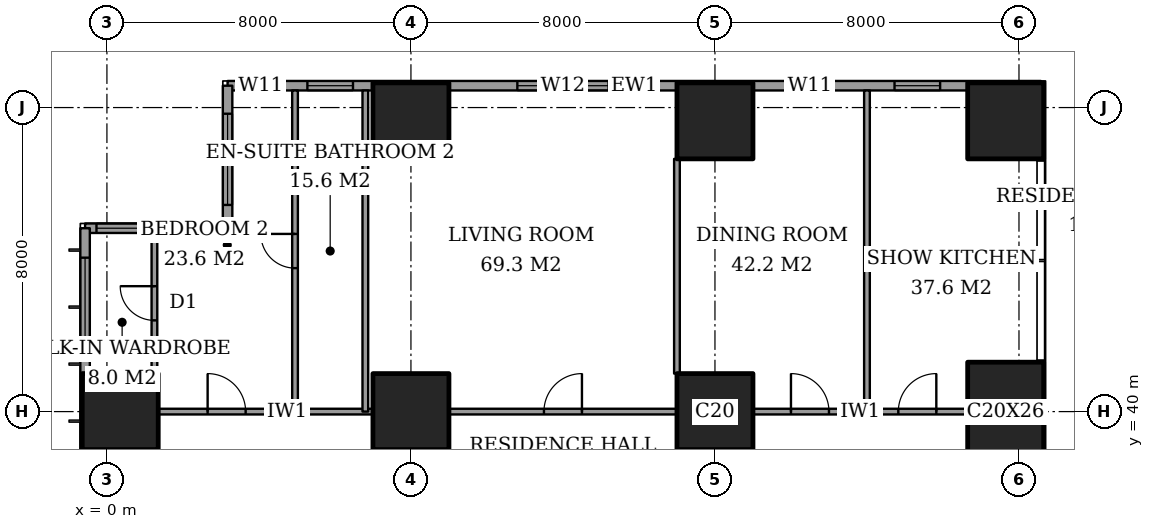
"""IFC4 building model, lengths in metres.
Left out: names, types, materials, properties, quantities, classifications, styles, units other than length and angle.
Written with IfcOpenShell. Run it as: python <this file> out.ifc"""

import sys

from ifc_helpers import new_model, si_unit, direction, frame, frame_2d, origin, origin_2d, place, context, subcontext, project, spatial, rectangle, extrude, element, fill, save


model = new_model("IFC4")
c1 = context("Model", 3, precision=1e-05, world=origin(), true_north=direction((0.0, 1.0)))
c2 = subcontext(c1, "Body", "Model", "MODEL_VIEW")
j1 = project(units=[si_unit("LENGTHUNIT", "METRE"), si_unit("PLANEANGLEUNIT", "RADIAN")], contexts=[c1])
p1 = place(None, origin())
s1 = spatial("IfcSite", under=j1, at=p1, CompositionType="ELEMENT")
p2 = place(p1, origin())
s2 = spatial("IfcBuilding", under=s1, at=p2, CompositionType="ELEMENT")
p3 = place(p2, frame((0.0, 0.0, 146.6)))
s3 = spatial("IfcBuildingStorey", under=s2, at=p3, CompositionType="ELEMENT", Elevation=146.6)
for number, where, z_axis, x_axis in (
    (1, (0.35, 40.0, 0.0), (0.0, 0.0, 1.0), (1.0, 0.0, 0.0)),
    (2, (8.0, 40.0, 0.0), (0.0, 0.0, 1.0), (1.0, 0.0, 0.0)),
    (3, (8.0, 47.65, 0.0), (0.0, 0.0, 1.0), (1.0, 0.0, 0.0)),
    (4, (16.0, 40.0, 0.0), (0.0, 0.0, 1.0), (1.0, 0.0, 0.0)),
    (5, (16.0, 47.65, 0.0), (0.0, 0.0, 1.0), (1.0, 0.0, 0.0)),
):
    element("IfcColumn", number, at=place(p3, frame(where, z_axis=z_axis, x_axis=x_axis)), inside=s3, PredefinedType="COLUMN", context=c2, shape_type="SweptSolid", body=[
        extrude(rectangle(XDim=2.0, YDim=2.0, at=origin_2d()), origin(), (0.0, 0.0, 1.0), 3.6),
    ])
p4 = place(p3, frame((23.65, 40.0, 0.0), z_axis=(0.0, 0.0, 1.0), x_axis=(1.0, 0.0, 0.0)))
e6 = element("IfcColumn", 6, at=p4, inside=s3, PredefinedType="COLUMN", context=c2, shape_type="SweptSolid", body=[
    extrude(rectangle(XDim=2.0, YDim=2.6, at=origin_2d()), origin(), (0.0, 0.0, 1.0), 3.6),
])
p5 = place(p3, frame((23.65, 47.65, 0.0), z_axis=(0.0, 0.0, 1.0), x_axis=(1.0, 0.0, 0.0)))
e7 = element("IfcColumn", 7, at=p5, inside=s3, PredefinedType="COLUMN", context=c2, shape_type="SweptSolid", body=[
    extrude(rectangle(XDim=2.0, YDim=2.0, at=origin_2d()), origin(), (0.0, 0.0, 1.0), 3.6),
])
p6 = place(p3, frame((24.575, 48.575, 0.0), z_axis=(0.0, 0.0, 1.0), x_axis=(-1.0, 0.0, 0.0)))
e8 = element("IfcWall", 8, at=p6, inside=s3, PredefinedType="SOLIDWALL", context=c2, shape_type="SweptSolid", body=[
    extrude(rectangle(XDim=21.4, YDim=0.25, at=frame_2d((10.7, 0.0))), origin(), (0.0, 0.0, 1.0), 3.6),
])
p7 = place(p6, frame((2.65, 0.0, 0.4)))
e9 = element("IfcOpeningElement", 9, at=p7, cuts=e8, PredefinedType="OPENING", context=c2, shape_type="SweptSolid", body=[
    extrude(rectangle(XDim=1.2, YDim=2.2, at=frame_2d((0.6, 1.1))), frame((0.0, 0.135, 0.0), z_axis=(0.0, -1.0, 0.0), x_axis=(1.0, 0.0, 0.0)), (0.0, 0.0, 1.0), 0.27),
])
p8 = place(p6, frame((5.475, 0.0, 0.4)))
e10 = element("IfcOpeningElement", 10, at=p8, cuts=e8, PredefinedType="OPENING", context=c2, shape_type="SweptSolid", body=[
    extrude(rectangle(XDim=1.2, YDim=2.2, at=frame_2d((0.6, 1.1))), frame((0.0, 0.135, 0.0), z_axis=(0.0, -1.0, 0.0), x_axis=(1.0, 0.0, 0.0)), (0.0, 0.0, 1.0), 0.27),
])
p9 = place(p6, frame((11.375, 0.0, 0.4)))
e11 = element("IfcOpeningElement", 11, at=p9, cuts=e8, PredefinedType="OPENING", context=c2, shape_type="SweptSolid", body=[
    extrude(rectangle(XDim=2.4, YDim=2.2, at=frame_2d((1.2, 1.1))), frame((0.0, 0.135, 0.0), z_axis=(0.0, -1.0, 0.0), x_axis=(1.0, 0.0, 0.0)), (0.0, 0.0, 1.0), 0.27),
])
p10 = place(p6, frame((18.1, 0.0, 0.4)))
e12 = element("IfcOpeningElement", 12, at=p10, cuts=e8, PredefinedType="OPENING", context=c2, shape_type="SweptSolid", body=[
    extrude(rectangle(XDim=1.2, YDim=2.2, at=frame_2d((0.6, 1.1))), frame((0.0, 0.135, 0.0), z_axis=(0.0, -1.0, 0.0), x_axis=(1.0, 0.0, 0.0)), (0.0, 0.0, 1.0), 0.27),
])
p11 = place(p6, frame((19.925, 0.0, 0.4)))
e13 = element("IfcOpeningElement", 13, at=p11, cuts=e8, PredefinedType="OPENING", context=c2, shape_type="SweptSolid", body=[
    extrude(rectangle(XDim=1.2, YDim=2.2, at=frame_2d((0.6, 1.1))), frame((0.0, 0.135, 0.0), z_axis=(0.0, -1.0, 0.0), x_axis=(1.0, 0.0, 0.0)), (0.0, 0.0, 1.0), 0.27),
])
p12 = place(p3, frame((3.175, 48.575, 0.0), z_axis=(0.0, 0.0, 1.0), x_axis=(0.0, -1.0, 0.0)))
e14 = element("IfcWall", 14, at=p12, inside=s3, PredefinedType="SOLIDWALL", context=c2, shape_type="SweptSolid", body=[
    extrude(rectangle(XDim=3.75, YDim=0.25, at=frame_2d((1.875, 0.0))), origin(), (0.0, 0.0, 1.0), 3.6),
])
p13 = place(p12, frame((0.738, 0.0, 0.4)))
e15 = element("IfcOpeningElement", 15, at=p13, cuts=e14, PredefinedType="OPENING", context=c2, shape_type="SweptSolid", body=[
    extrude(rectangle(XDim=2.4, YDim=2.2, at=frame_2d((1.2, 1.1))), frame((0.0, 0.135, 0.0), z_axis=(0.0, -1.0, 0.0), x_axis=(1.0, 0.0, 0.0)), (0.0, 0.0, 1.0), 0.27),
])
p14 = place(p3, frame((3.175, 44.825, 0.0), z_axis=(0.0, 0.0, 1.0), x_axis=(-1.0, 0.0, 0.0)))
e16 = element("IfcWall", 16, at=p14, inside=s3, PredefinedType="SOLIDWALL", context=c2, shape_type="SweptSolid", body=[
    extrude(rectangle(XDim=3.75, YDim=0.25, at=frame_2d((1.875, 0.0))), origin(), (0.0, 0.0, 1.0), 3.6),
])
p15 = place(p14, frame((0.363, 0.0, 0.4)))
e17 = element("IfcOpeningElement", 17, at=p15, cuts=e16, PredefinedType="OPENING", context=c2, shape_type="SweptSolid", body=[
    extrude(rectangle(XDim=1.2, YDim=2.2, at=frame_2d((0.6, 1.1))), frame((0.0, 0.135, 0.0), z_axis=(0.0, -1.0, 0.0), x_axis=(1.0, 0.0, 0.0)), (0.0, 0.0, 1.0), 0.27),
])
p16 = place(p14, frame((2.25, 0.0, 0.4)))
e18 = element("IfcOpeningElement", 18, at=p16, cuts=e16, PredefinedType="OPENING", context=c2, shape_type="SweptSolid", body=[
    extrude(rectangle(XDim=1.2, YDim=2.2, at=frame_2d((0.6, 1.1))), frame((0.0, 0.135, 0.0), z_axis=(0.0, -1.0, 0.0), x_axis=(1.0, 0.0, 0.0)), (0.0, 0.0, 1.0), 0.27),
])
p17 = place(p3, frame((-0.575, 44.825, 0.0), z_axis=(0.0, 0.0, 1.0), x_axis=(0.0, -1.0, 0.0)))
e19 = element("IfcWall", 19, at=p17, inside=s3, PredefinedType="SOLIDWALL", context=c2, shape_type="SweptSolid", body=[
    extrude(rectangle(XDim=41.65, YDim=0.25, at=frame_2d((20.825, 0.0))), origin(), (0.0, 0.0, 1.0), 3.6),
])
p18 = place(p17, frame((0.775, 0.0, 0.4)))
e20 = element("IfcOpeningElement", 20, at=p18, cuts=e19, PredefinedType="OPENING", context=c2, shape_type="SweptSolid", body=[
    extrude(rectangle(XDim=2.4, YDim=2.2, at=frame_2d((1.2, 1.1))), frame((0.0, 0.135, 0.0), z_axis=(0.0, -1.0, 0.0), x_axis=(1.0, 0.0, 0.0)), (0.0, 0.0, 1.0), 0.27),
])
p19 = place(p17, frame((6.1, 0.0, 0.4)))
e21 = element("IfcOpeningElement", 21, at=p19, cuts=e19, PredefinedType="OPENING", context=c2, shape_type="SweptSolid", body=[
    extrude(rectangle(XDim=1.2, YDim=2.2, at=frame_2d((0.6, 1.1))), frame((0.0, 0.135, 0.0), z_axis=(0.0, -1.0, 0.0), x_axis=(1.0, 0.0, 0.0)), (0.0, 0.0, 1.0), 0.27),
])
p20 = place(p17, frame((8.425, 0.0, 0.4)))
e22 = element("IfcOpeningElement", 22, at=p20, cuts=e19, PredefinedType="OPENING", context=c2, shape_type="SweptSolid", body=[
    extrude(rectangle(XDim=2.4, YDim=2.2, at=frame_2d((1.2, 1.1))), frame((0.0, 0.135, 0.0), z_axis=(0.0, -1.0, 0.0), x_axis=(1.0, 0.0, 0.0)), (0.0, 0.0, 1.0), 0.27),
])
p21 = place(p17, frame((15.625, 0.0, 0.4)))
e23 = element("IfcOpeningElement", 23, at=p21, cuts=e19, PredefinedType="OPENING", context=c2, shape_type="SweptSolid", body=[
    extrude(rectangle(XDim=2.4, YDim=2.2, at=frame_2d((1.2, 1.1))), frame((0.0, 0.135, 0.0), z_axis=(0.0, -1.0, 0.0), x_axis=(1.0, 0.0, 0.0)), (0.0, 0.0, 1.0), 0.27),
])
p22 = place(p17, frame((23.625, 0.0, 0.4)))
e24 = element("IfcOpeningElement", 24, at=p22, cuts=e19, PredefinedType="OPENING", context=c2, shape_type="SweptSolid", body=[
    extrude(rectangle(XDim=2.4, YDim=2.2, at=frame_2d((1.2, 1.1))), frame((0.0, 0.135, 0.0), z_axis=(0.0, -1.0, 0.0), x_axis=(1.0, 0.0, 0.0)), (0.0, 0.0, 1.0), 0.27),
])
p23 = place(p17, frame((30.625, 0.0, 0.4)))
e25 = element("IfcOpeningElement", 25, at=p23, cuts=e19, PredefinedType="OPENING", context=c2, shape_type="SweptSolid", body=[
    extrude(rectangle(XDim=2.4, YDim=2.2, at=frame_2d((1.2, 1.1))), frame((0.0, 0.135, 0.0), z_axis=(0.0, -1.0, 0.0), x_axis=(1.0, 0.0, 0.0)), (0.0, 0.0, 1.0), 0.27),
])
p24 = place(p17, frame((34.225, 0.0, 0.4)))
e26 = element("IfcOpeningElement", 26, at=p24, cuts=e19, PredefinedType="OPENING", context=c2, shape_type="SweptSolid", body=[
    extrude(rectangle(XDim=1.2, YDim=2.2, at=frame_2d((0.6, 1.1))), frame((0.0, 0.135, 0.0), z_axis=(0.0, -1.0, 0.0), x_axis=(1.0, 0.0, 0.0)), (0.0, 0.0, 1.0), 0.27),
])
p25 = place(p17, frame((38.475, 0.0, 0.4)))
e27 = element("IfcOpeningElement", 27, at=p25, cuts=e19, PredefinedType="OPENING", context=c2, shape_type="SweptSolid", body=[
    extrude(rectangle(XDim=2.4, YDim=2.2, at=frame_2d((1.2, 1.1))), frame((0.0, 0.135, 0.0), z_axis=(0.0, -1.0, 0.0), x_axis=(1.0, 0.0, 0.0)), (0.0, 0.0, 1.0), 0.27),
])
p26 = place(p3, frame((1.35, 40.0, 0.0), z_axis=(0.0, 0.0, 1.0), x_axis=(1.0, 0.0, 0.0)))
e28 = element("IfcWall", 28, at=p26, inside=s3, PredefinedType="PARTITIONING", context=c2, shape_type="SweptSolid", body=[
    extrude(rectangle(XDim=5.65, YDim=0.15, at=frame_2d((2.825, 0.0))), origin(), (0.0, 0.0, 1.0), 3.35),
])
p27 = place(p26, frame((1.3, 0.0, 0.0)))
e29 = element("IfcOpeningElement", 29, at=p27, cuts=e28, PredefinedType="OPENING", context=c2, shape_type="SweptSolid", body=[
    extrude(rectangle(XDim=1.0, YDim=2.1, at=frame_2d((0.5, 1.05))), frame((0.0, 0.085, 0.0), z_axis=(0.0, -1.0, 0.0), x_axis=(1.0, 0.0, 0.0)), (0.0, 0.0, 1.0), 0.17),
])
p28 = place(p3, frame((9.0, 40.0, 0.0), z_axis=(0.0, 0.0, 1.0), x_axis=(1.0, 0.0, 0.0)))
e30 = element("IfcWall", 30, at=p28, inside=s3, PredefinedType="PARTITIONING", context=c2, shape_type="SweptSolid", body=[
    extrude(rectangle(XDim=6.0, YDim=0.15, at=frame_2d((3.0, 0.0))), origin(), (0.0, 0.0, 1.0), 3.35),
])
p29 = place(p28, frame((2.5, 0.0, 0.0)))
e31 = element("IfcOpeningElement", 31, at=p29, cuts=e30, PredefinedType="OPENING", context=c2, shape_type="SweptSolid", body=[
    extrude(rectangle(XDim=1.0, YDim=2.1, at=frame_2d((0.5, 1.05))), frame((0.0, 0.085, 0.0), z_axis=(0.0, -1.0, 0.0), x_axis=(1.0, 0.0, 0.0)), (0.0, 0.0, 1.0), 0.17),
])
p30 = place(p3, frame((17.0, 40.0, 0.0), z_axis=(0.0, 0.0, 1.0), x_axis=(1.0, 0.0, 0.0)))
e32 = element("IfcWall", 32, at=p30, inside=s3, PredefinedType="PARTITIONING", context=c2, shape_type="SweptSolid", body=[
    extrude(rectangle(XDim=5.65, YDim=0.15, at=frame_2d((2.825, 0.0))), origin(), (0.0, 0.0, 1.0), 3.35),
])
p31 = place(p30, frame((1.0, 0.0, 0.0)))
e33 = element("IfcOpeningElement", 33, at=p31, cuts=e32, PredefinedType="OPENING", context=c2, shape_type="SweptSolid", body=[
    extrude(rectangle(XDim=1.0, YDim=2.1, at=frame_2d((0.5, 1.05))), frame((0.0, 0.085, 0.0), z_axis=(0.0, -1.0, 0.0), x_axis=(1.0, 0.0, 0.0)), (0.0, 0.0, 1.0), 0.17),
])
p32 = place(p30, frame((3.825, 0.0, 0.0)))
e34 = element("IfcOpeningElement", 34, at=p32, cuts=e32, PredefinedType="OPENING", context=c2, shape_type="SweptSolid", body=[
    extrude(rectangle(XDim=1.0, YDim=2.1, at=frame_2d((0.5, 1.05))), frame((0.0, 0.085, 0.0), z_axis=(0.0, -1.0, 0.0), x_axis=(1.0, 0.0, 0.0)), (0.0, 0.0, 1.0), 0.17),
])
p33 = place(p3, frame((1.25, 41.0, 0.0), z_axis=(0.0, 0.0, 1.0), x_axis=(0.0, 1.0, 0.0)))
e35 = element("IfcWall", 35, at=p33, inside=s3, PredefinedType="PARTITIONING", context=c2, shape_type="SweptSolid", body=[
    extrude(rectangle(XDim=3.7, YDim=0.15, at=frame_2d((1.85, 0.0))), origin(), (0.0, 0.0, 1.0), 3.35),
])
p34 = place(p33, frame((1.4, 0.0, 0.0)))
e36 = element("IfcOpeningElement", 36, at=p34, cuts=e35, PredefinedType="OPENING", context=c2, shape_type="SweptSolid", body=[
    extrude(rectangle(XDim=0.9, YDim=2.1, at=frame_2d((0.45, 1.05))), frame((0.0, 0.085, 0.0), z_axis=(0.0, -1.0, 0.0), x_axis=(1.0, 0.0, 0.0)), (0.0, 0.0, 1.0), 0.17),
])
p35 = place(p3, frame((4.95, 40.0, 0.0), z_axis=(0.0, 0.0, 1.0), x_axis=(0.0, 1.0, 0.0)))
e37 = element("IfcWall", 37, at=p35, inside=s3, PredefinedType="PARTITIONING", context=c2, shape_type="SweptSolid", body=[
    extrude(rectangle(XDim=8.45, YDim=0.15, at=frame_2d((4.225, 0.0))), origin(), (0.0, 0.0, 1.0), 3.35),
])
p36 = place(p35, frame((3.775, 0.0, 0.0)))
e38 = element("IfcOpeningElement", 38, at=p36, cuts=e37, PredefinedType="OPENING", context=c2, shape_type="SweptSolid", body=[
    extrude(rectangle(XDim=0.9, YDim=2.1, at=frame_2d((0.45, 1.05))), frame((0.0, 0.085, 0.0), z_axis=(0.0, -1.0, 0.0), x_axis=(1.0, 0.0, 0.0)), (0.0, 0.0, 1.0), 0.17),
])
p37 = place(p3, frame((6.8, 40.0, 0.0), z_axis=(0.0, 0.0, 1.0), x_axis=(0.0, 1.0, 0.0)))
e39 = element("IfcWall", 39, at=p37, inside=s3, PredefinedType="PARTITIONING", context=c2, shape_type="SweptSolid", body=[
    extrude(rectangle(XDim=8.45, YDim=0.15, at=frame_2d((4.225, 0.0))), origin(), (0.0, 0.0, 1.0), 3.35),
])
p38 = place(p3, frame((15.0, 41.0, 0.0), z_axis=(0.0, 0.0, 1.0), x_axis=(0.0, 1.0, 0.0)))
e40 = element("IfcWall", 40, at=p38, inside=s3, PredefinedType="PARTITIONING", context=c2, shape_type="SweptSolid", body=[
    extrude(rectangle(XDim=5.65, YDim=0.15, at=frame_2d((2.825, 0.0))), origin(), (0.0, 0.0, 1.0), 3.35),
])
p39 = place(p3, frame((20.0, 40.0, 0.0), z_axis=(0.0, 0.0, 1.0), x_axis=(0.0, 1.0, 0.0)))
e41 = element("IfcWall", 41, at=p39, inside=s3, PredefinedType="PARTITIONING", context=c2, shape_type="SweptSolid", body=[
    extrude(rectangle(XDim=8.45, YDim=0.15, at=frame_2d((4.225, 0.0))), origin(), (0.0, 0.0, 1.0), 3.35),
])
p40 = place(p7, origin())
e42 = element("IfcWindow", 42, at=p40, inside=s3, PartitioningType="SINGLE_PANEL", PredefinedType="WINDOW", context=c2, shape_type="SweptSolid", body=[
    extrude(rectangle(XDim=1.2, YDim=2.2, at=frame_2d((0.6, 1.1))), frame((0.0, 0.03, 0.0), z_axis=(0.0, -1.0, 0.0), x_axis=(1.0, 0.0, 0.0)), (0.0, 0.0, 1.0), 0.06),
])
fill(e9, e42)
p41 = place(p8, origin())
e43 = element("IfcWindow", 43, at=p41, inside=s3, PartitioningType="SINGLE_PANEL", PredefinedType="WINDOW", context=c2, shape_type="SweptSolid", body=[
    extrude(rectangle(XDim=1.2, YDim=2.2, at=frame_2d((0.6, 1.1))), frame((0.0, 0.03, 0.0), z_axis=(0.0, -1.0, 0.0), x_axis=(1.0, 0.0, 0.0)), (0.0, 0.0, 1.0), 0.06),
])
fill(e10, e43)
p42 = place(p9, origin())
e44 = element("IfcWindow", 44, at=p42, inside=s3, PartitioningType="SINGLE_PANEL", PredefinedType="WINDOW", context=c2, shape_type="SweptSolid", body=[
    extrude(rectangle(XDim=2.4, YDim=2.2, at=frame_2d((1.2, 1.1))), frame((0.0, 0.03, 0.0), z_axis=(0.0, -1.0, 0.0), x_axis=(1.0, 0.0, 0.0)), (0.0, 0.0, 1.0), 0.06),
])
fill(e11, e44)
p43 = place(p10, origin())
e45 = element("IfcWindow", 45, at=p43, inside=s3, PartitioningType="SINGLE_PANEL", PredefinedType="WINDOW", context=c2, shape_type="SweptSolid", body=[
    extrude(rectangle(XDim=1.2, YDim=2.2, at=frame_2d((0.6, 1.1))), frame((0.0, 0.03, 0.0), z_axis=(0.0, -1.0, 0.0), x_axis=(1.0, 0.0, 0.0)), (0.0, 0.0, 1.0), 0.06),
])
fill(e12, e45)
p44 = place(p11, origin())
e46 = element("IfcWindow", 46, at=p44, inside=s3, PartitioningType="SINGLE_PANEL", PredefinedType="WINDOW", context=c2, shape_type="SweptSolid", body=[
    extrude(rectangle(XDim=1.2, YDim=2.2, at=frame_2d((0.6, 1.1))), frame((0.0, 0.03, 0.0), z_axis=(0.0, -1.0, 0.0), x_axis=(1.0, 0.0, 0.0)), (0.0, 0.0, 1.0), 0.06),
])
fill(e13, e46)
p45 = place(p13, origin())
e47 = element("IfcWindow", 47, at=p45, inside=s3, PartitioningType="SINGLE_PANEL", PredefinedType="WINDOW", context=c2, shape_type="SweptSolid", body=[
    extrude(rectangle(XDim=2.4, YDim=2.2, at=frame_2d((1.2, 1.1))), frame((0.0, 0.03, 0.0), z_axis=(0.0, -1.0, 0.0), x_axis=(1.0, 0.0, 0.0)), (0.0, 0.0, 1.0), 0.06),
])
fill(e15, e47)
p46 = place(p15, origin())
e48 = element("IfcWindow", 48, at=p46, inside=s3, PartitioningType="SINGLE_PANEL", PredefinedType="WINDOW", context=c2, shape_type="SweptSolid", body=[
    extrude(rectangle(XDim=1.2, YDim=2.2, at=frame_2d((0.6, 1.1))), frame((0.0, 0.03, 0.0), z_axis=(0.0, -1.0, 0.0), x_axis=(1.0, 0.0, 0.0)), (0.0, 0.0, 1.0), 0.06),
])
fill(e17, e48)
p47 = place(p16, origin())
e49 = element("IfcWindow", 49, at=p47, inside=s3, PartitioningType="SINGLE_PANEL", PredefinedType="WINDOW", context=c2, shape_type="SweptSolid", body=[
    extrude(rectangle(XDim=1.2, YDim=2.2, at=frame_2d((0.6, 1.1))), frame((0.0, 0.03, 0.0), z_axis=(0.0, -1.0, 0.0), x_axis=(1.0, 0.0, 0.0)), (0.0, 0.0, 1.0), 0.06),
])
fill(e18, e49)
p48 = place(p18, origin())
e50 = element("IfcWindow", 50, at=p48, inside=s3, PartitioningType="SINGLE_PANEL", PredefinedType="WINDOW", context=c2, shape_type="SweptSolid", body=[
    extrude(rectangle(XDim=2.4, YDim=2.2, at=frame_2d((1.2, 1.1))), frame((0.0, 0.03, 0.0), z_axis=(0.0, -1.0, 0.0), x_axis=(1.0, 0.0, 0.0)), (0.0, 0.0, 1.0), 0.06),
])
fill(e20, e50)
p49 = place(p34, origin())
e51 = element("IfcDoor", 51, at=p49, inside=s3, OperationType="SINGLE_SWING_LEFT", PredefinedType="DOOR", context=c2, shape_type="SweptSolid", body=[
    extrude(rectangle(XDim=0.9, YDim=2.1, at=frame_2d((0.45, 1.05))), frame((0.0, 0.025, 0.0), z_axis=(0.0, -1.0, 0.0), x_axis=(1.0, 0.0, 0.0)), (0.0, 0.0, 1.0), 0.05),
])
fill(e36, e51)
p50 = place(p27, origin())
e52 = element("IfcDoor", 52, at=p50, inside=s3, OperationType="SINGLE_SWING_RIGHT", PredefinedType="DOOR", context=c2, shape_type="SweptSolid", body=[
    extrude(rectangle(XDim=1.0, YDim=2.1, at=frame_2d((0.5, 1.05))), frame((0.0, 0.025, 0.0), z_axis=(0.0, -1.0, 0.0), x_axis=(1.0, 0.0, 0.0)), (0.0, 0.0, 1.0), 0.05),
])
fill(e29, e52)
p51 = place(p36, origin())
e53 = element("IfcDoor", 53, at=p51, inside=s3, OperationType="SINGLE_SWING_LEFT", PredefinedType="DOOR", context=c2, shape_type="SweptSolid", body=[
    extrude(rectangle(XDim=0.9, YDim=2.1, at=frame_2d((0.45, 1.05))), frame((0.0, 0.025, 0.0), z_axis=(0.0, -1.0, 0.0), x_axis=(1.0, 0.0, 0.0)), (0.0, 0.0, 1.0), 0.05),
])
fill(e38, e53)
p52 = place(p29, origin())
e54 = element("IfcDoor", 54, at=p52, inside=s3, OperationType="SINGLE_SWING_LEFT", PredefinedType="DOOR", context=c2, shape_type="SweptSolid", body=[
    extrude(rectangle(XDim=1.0, YDim=2.1, at=frame_2d((0.5, 1.05))), frame((0.0, 0.025, 0.0), z_axis=(0.0, -1.0, 0.0), x_axis=(1.0, 0.0, 0.0)), (0.0, 0.0, 1.0), 0.05),
])
fill(e31, e54)
p53 = place(p31, origin())
e55 = element("IfcDoor", 55, at=p53, inside=s3, OperationType="SINGLE_SWING_RIGHT", PredefinedType="DOOR", context=c2, shape_type="SweptSolid", body=[
    extrude(rectangle(XDim=1.0, YDim=2.1, at=frame_2d((0.5, 1.05))), frame((0.0, 0.025, 0.0), z_axis=(0.0, -1.0, 0.0), x_axis=(1.0, 0.0, 0.0)), (0.0, 0.0, 1.0), 0.05),
])
fill(e33, e55)
p54 = place(p32, origin())
e56 = element("IfcDoor", 56, at=p54, inside=s3, OperationType="SINGLE_SWING_LEFT", PredefinedType="DOOR", context=c2, shape_type="SweptSolid", body=[
    extrude(rectangle(XDim=1.0, YDim=2.1, at=frame_2d((0.5, 1.05))), frame((0.0, 0.025, 0.0), z_axis=(0.0, -1.0, 0.0), x_axis=(1.0, 0.0, 0.0)), (0.0, 0.0, 1.0), 0.05),
])
fill(e34, e56)
save(model, sys.argv[1])
